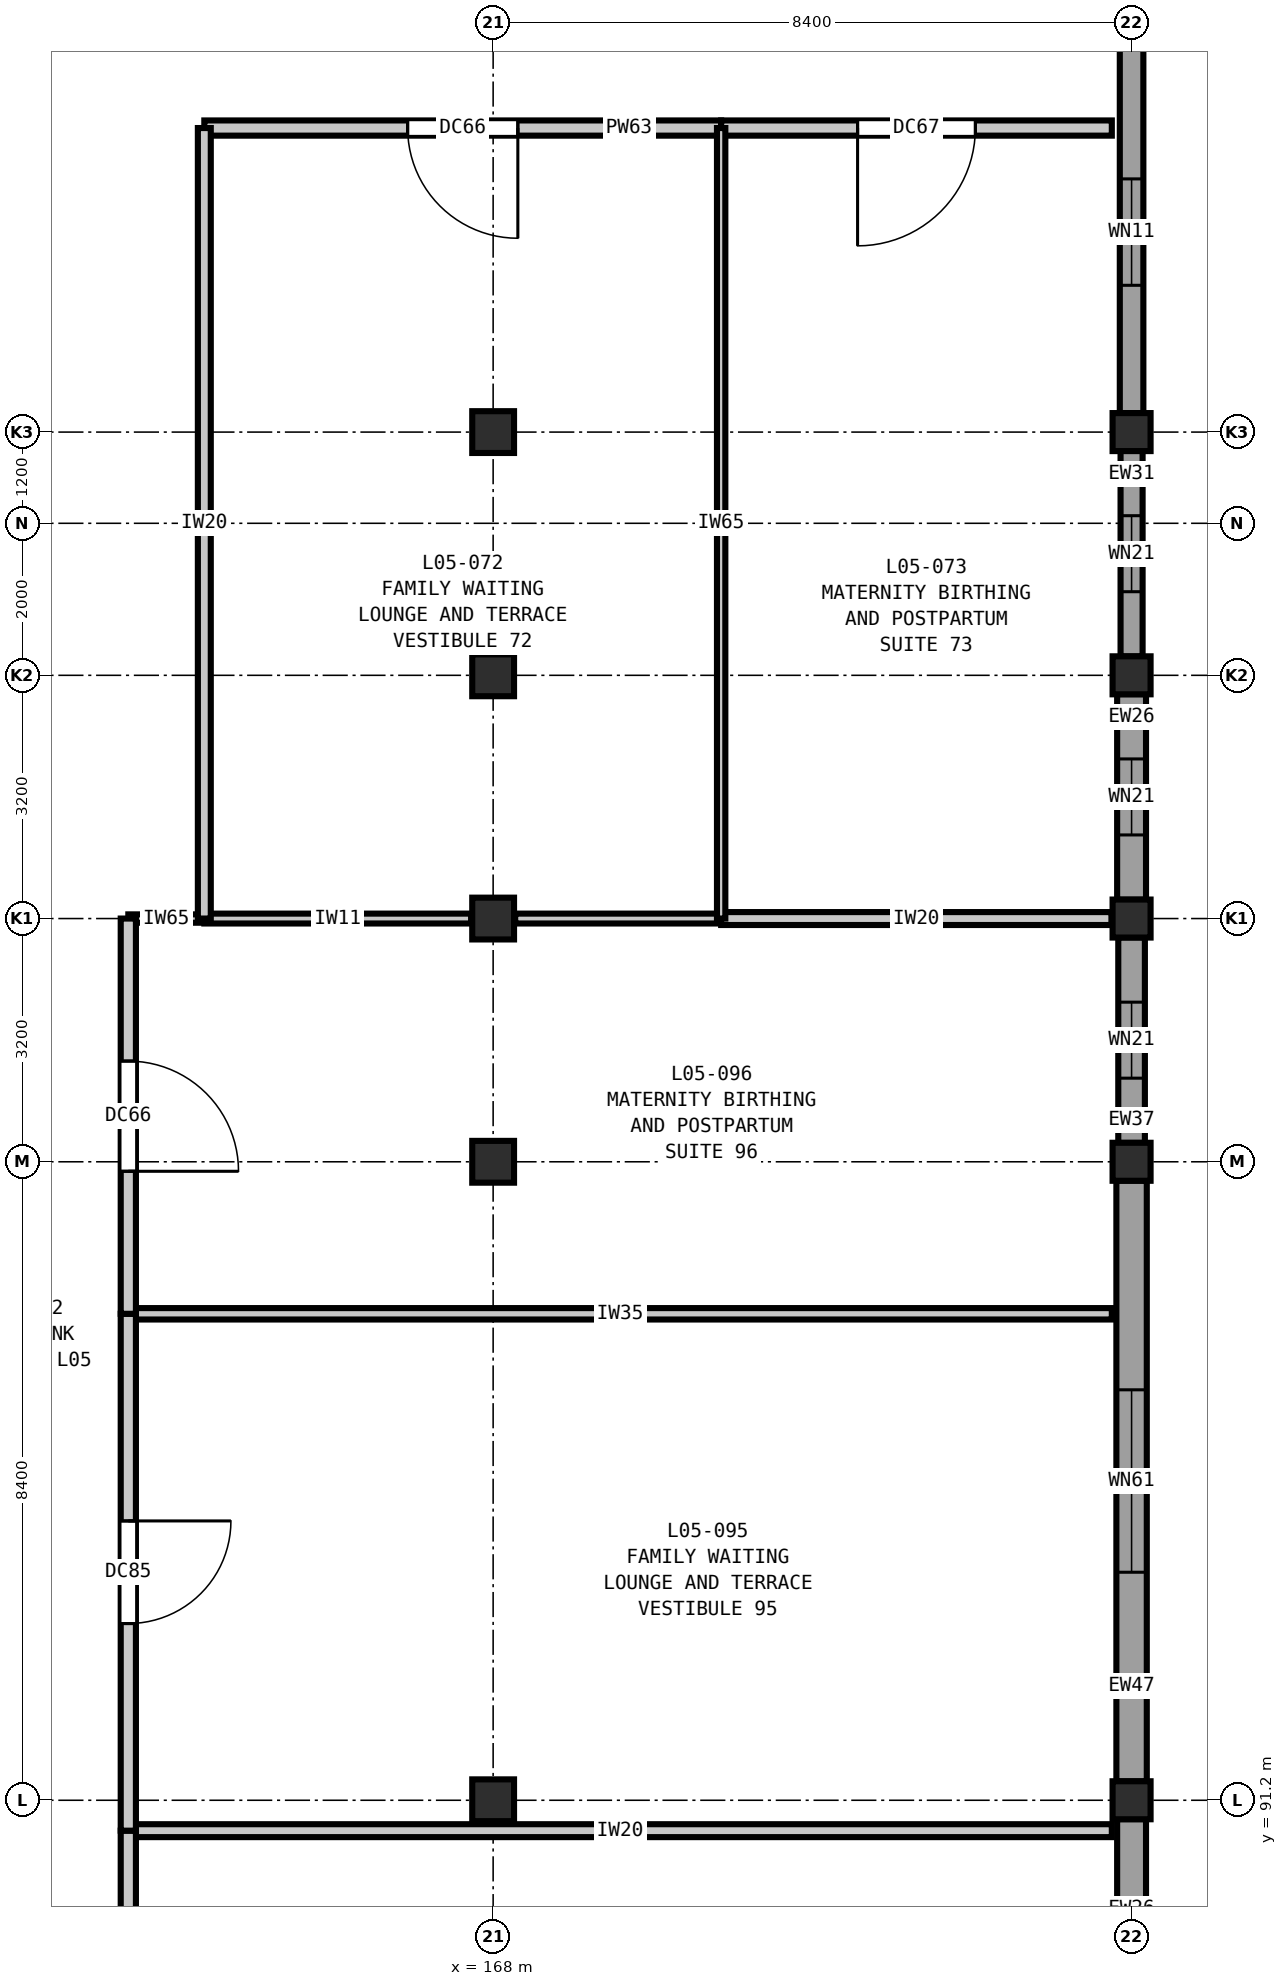
"""IFC4 building model, lengths in metres.
Left out: names, types, materials, properties, quantities, classifications, styles, units other than length and angle.
Written with IfcOpenShell. Run it as: python <this file> out.ifc"""

import sys

from ifc_helpers import new_model, si_unit, direction, frame, frame_2d, origin, origin_2d, place, context, subcontext, project, spatial, rectangle, extrude, element, fill, save


model = new_model("IFC4")
c1 = context("Model", 3, precision=1e-05, world=origin(), true_north=direction((0.0, 1.0)))
c2 = subcontext(c1, "Body", "Model", "MODEL_VIEW")
j1 = project(units=[si_unit("LENGTHUNIT", "METRE"), si_unit("PLANEANGLEUNIT", "RADIAN")], contexts=[c1])
p1 = place(None, origin())
s1 = spatial("IfcSite", under=j1, at=p1, CompositionType="ELEMENT")
p2 = place(p1, origin())
s2 = spatial("IfcBuilding", under=s1, at=p2, CompositionType="ELEMENT")
p3 = place(p2, frame((0.0, 0.0, 24.6)))
s3 = spatial("IfcBuildingStorey", under=s2, at=p3, CompositionType="ELEMENT", Elevation=24.6)
for number, where, z_axis, x_axis in (
    (1, (168.0, 91.2, 0.0), (0.0, 0.0, 1.0), (1.0, 0.0, 0.0)),
    (2, (168.0, 99.6, 0.0), (0.0, 0.0, 1.0), (1.0, 0.0, 0.0)),
    (3, (168.0, 102.8, 0.0), (0.0, 0.0, 1.0), (1.0, 0.0, 0.0)),
    (4, (168.0, 106.0, 0.0), (0.0, 0.0, 1.0), (1.0, 0.0, 0.0)),
    (5, (168.0, 109.2, 0.0), (0.0, 0.0, 1.0), (1.0, 0.0, 0.0)),
):
    element("IfcColumn", number, at=place(p3, frame(where, z_axis=z_axis, x_axis=x_axis)), inside=s3, PredefinedType="COLUMN", context=c2, shape_type="SweptSolid", body=[
        extrude(rectangle(XDim=0.55, YDim=0.55, at=origin_2d()), origin(), (0.0, 0.0, 1.0), 4.2),
    ])
for number, where, z_axis, x_axis in (
    (6, (176.4, 91.2, 0.0), (0.0, 0.0, 1.0), (1.0, 0.0, 0.0)),
    (7, (176.4, 99.6, 0.0), (0.0, 0.0, 1.0), (1.0, 0.0, 0.0)),
    (8, (176.4, 102.8, 0.0), (0.0, 0.0, 1.0), (1.0, 0.0, 0.0)),
    (9, (176.4, 106.0, 0.0), (0.0, 0.0, 1.0), (1.0, 0.0, 0.0)),
    (10, (176.4, 109.2, 0.0), (0.0, 0.0, 1.0), (1.0, 0.0, 0.0)),
):
    element("IfcColumn", number, at=place(p3, frame(where, z_axis=z_axis, x_axis=x_axis)), inside=s3, PredefinedType="COLUMN", context=c2, shape_type="SweptSolid", body=[
        extrude(rectangle(XDim=0.5, YDim=0.5, at=origin_2d()), origin(), (0.0, 0.0, 1.0), 4.2),
    ])
p4 = place(p3, frame((176.4, 116.152, 0.0), z_axis=(0.0, 0.0, 1.0), x_axis=(0.0, -1.0, 0.0)))
e11 = element("IfcWall", 11, at=p4, inside=s3, PredefinedType="SOLIDWALL", context=c2, shape_type="SweptSolid", body=[
    extrude(rectangle(XDim=6.704, YDim=0.31, at=frame_2d((3.352, 0.0))), origin(), (0.0, 0.0, 1.0), 3.48),
])
p5 = place(p4, frame((3.621, 0.0, 0.9)))
e12 = element("IfcOpeningElement", 12, at=p5, cuts=e11, PredefinedType="OPENING", context=c2, shape_type="SweptSolid", body=[
    extrude(rectangle(XDim=1.4, YDim=2.15, at=frame_2d((0.7, 1.075))), frame((0.0, 0.165, 0.0), z_axis=(0.0, -1.0, 0.0), x_axis=(1.0, 0.0, 0.0)), (0.0, 0.0, 1.0), 0.33),
])
p6 = place(p3, frame((176.4, 108.952, 0.0), z_axis=(0.0, 0.0, 1.0), x_axis=(0.0, -1.0, 0.0)))
e13 = element("IfcWall", 13, at=p6, inside=s3, PredefinedType="SOLIDWALL", context=c2, shape_type="SweptSolid", body=[
    extrude(rectangle(XDim=2.704, YDim=0.29, at=frame_2d((1.352, 0.0))), origin(), (0.0, 0.0, 1.0), 3.48),
])
p7 = place(p6, frame((0.852, 0.0, 0.9)))
e14 = element("IfcOpeningElement", 14, at=p7, cuts=e13, PredefinedType="OPENING", context=c2, shape_type="SweptSolid", body=[
    extrude(rectangle(XDim=1.0, YDim=1.55, at=frame_2d((0.5, 0.775))), frame((0.0, 0.155, 0.0), z_axis=(0.0, -1.0, 0.0), x_axis=(1.0, 0.0, 0.0)), (0.0, 0.0, 1.0), 0.31),
])
p8 = place(p3, frame((176.4, 105.752, 0.0), z_axis=(0.0, 0.0, 1.0), x_axis=(0.0, -1.0, 0.0)))
e15 = element("IfcWall", 15, at=p8, inside=s3, PredefinedType="SOLIDWALL", context=c2, shape_type="SweptSolid", body=[
    extrude(rectangle(XDim=2.704, YDim=0.38, at=frame_2d((1.352, 0.0))), origin(), (0.0, 0.0, 1.0), 3.48),
])
p9 = place(p8, frame((0.852, 0.0, 0.9)))
e16 = element("IfcOpeningElement", 16, at=p9, cuts=e15, PredefinedType="OPENING", context=c2, shape_type="SweptSolid", body=[
    extrude(rectangle(XDim=1.0, YDim=1.55, at=frame_2d((0.5, 0.775))), frame((0.0, 0.2, 0.0), z_axis=(0.0, -1.0, 0.0), x_axis=(1.0, 0.0, 0.0)), (0.0, 0.0, 1.0), 0.4),
])
p10 = place(p3, frame((176.4, 102.552, 0.0), z_axis=(0.0, 0.0, 1.0), x_axis=(0.0, -1.0, 0.0)))
e17 = element("IfcWall", 17, at=p10, inside=s3, PredefinedType="SOLIDWALL", context=c2, shape_type="SweptSolid", body=[
    extrude(rectangle(XDim=2.704, YDim=0.35, at=frame_2d((1.352, 0.0))), origin(), (0.0, 0.0, 1.0), 3.48),
])
p11 = place(p10, frame((0.852, 0.0, 0.9)))
e18 = element("IfcOpeningElement", 18, at=p11, cuts=e17, PredefinedType="OPENING", context=c2, shape_type="SweptSolid", body=[
    extrude(rectangle(XDim=1.0, YDim=1.55, at=frame_2d((0.5, 0.775))), frame((0.0, 0.185, 0.0), z_axis=(0.0, -1.0, 0.0), x_axis=(1.0, 0.0, 0.0)), (0.0, 0.0, 1.0), 0.37),
])
p12 = place(p3, frame((176.4, 99.352, 0.0), z_axis=(0.0, 0.0, 1.0), x_axis=(0.0, -1.0, 0.0)))
e19 = element("IfcWall", 19, at=p12, inside=s3, PredefinedType="SOLIDWALL", context=c2, shape_type="SweptSolid", body=[
    extrude(rectangle(XDim=7.904, YDim=0.4, at=frame_2d((3.952, 0.0))), origin(), (0.0, 0.0, 1.0), 3.48),
])
p13 = place(p12, frame((2.752, 0.0, 0.9)))
e20 = element("IfcOpeningElement", 20, at=p13, cuts=e19, PredefinedType="OPENING", context=c2, shape_type="SweptSolid", body=[
    extrude(rectangle(XDim=2.4, YDim=2.15, at=frame_2d((1.2, 1.075))), frame((0.0, 0.21, 0.0), z_axis=(0.0, -1.0, 0.0), x_axis=(1.0, 0.0, 0.0)), (0.0, 0.0, 1.0), 0.42),
])
p14 = place(p3, frame((176.4, 90.952, 0.0), z_axis=(0.0, 0.0, 1.0), x_axis=(0.0, -1.0, 0.0)))
e21 = element("IfcWall", 21, at=p14, inside=s3, PredefinedType="SOLIDWALL", context=c2, shape_type="SweptSolid", body=[
    extrude(rectangle(XDim=7.904, YDim=0.38, at=frame_2d((3.952, 0.0))), origin(), (0.0, 0.0, 1.0), 3.48),
])
p15 = place(p14, frame((2.602, 0.0, 0.9)))
e22 = element("IfcOpeningElement", 22, at=p15, cuts=e21, PredefinedType="OPENING", context=c2, shape_type="SweptSolid", body=[
    extrude(rectangle(XDim=2.7, YDim=2.15, at=frame_2d((1.35, 1.075))), frame((0.0, 0.2, 0.0), z_axis=(0.0, -1.0, 0.0), x_axis=(1.0, 0.0, 0.0)), (0.0, 0.0, 1.0), 0.4),
])
p16 = place(p3, frame((163.2, 90.8, 0.0), z_axis=(0.0, 0.0, 1.0), x_axis=(1.0, 0.0, 0.0)))
e23 = element("IfcWall", 23, at=p16, inside=s3, PredefinedType="PARTITIONING", context=c2, shape_type="SweptSolid", body=[
    extrude(rectangle(XDim=12.94, YDim=0.17, at=frame_2d((6.47, 0.0))), origin(), (0.0, 0.0, 1.0), 3.92),
])
p17 = place(p3, frame((163.2, 97.6, 0.0), z_axis=(0.0, 0.0, 1.0), x_axis=(1.0, 0.0, 0.0)))
e24 = element("IfcWall", 24, at=p17, inside=s3, PredefinedType="PARTITIONING", context=c2, shape_type="SweptSolid", body=[
    extrude(rectangle(XDim=12.94, YDim=0.15, at=frame_2d((6.47, 0.0))), origin(), (0.0, 0.0, 1.0), 3.92),
])
p18 = place(p3, frame((163.2, 102.8, 0.0), z_axis=(0.0, 0.0, 1.0), x_axis=(1.0, 0.0, 0.0)))
e25 = element("IfcWall", 25, at=p18, inside=s3, PredefinedType="PARTITIONING", context=c2, shape_type="SweptSolid", body=[
    extrude(rectangle(XDim=1.0, YDim=0.11, at=frame_2d((0.5, 0.0))), origin(), (0.0, 0.0, 1.0), 3.585),
])
p19 = place(p3, frame((164.2, 102.8, 0.0), z_axis=(0.0, 0.0, 1.0), x_axis=(1.0, 0.0, 0.0)))
e26 = element("IfcWall", 26, at=p19, inside=s3, PredefinedType="PARTITIONING", context=c2, shape_type="SweptSolid", body=[
    extrude(rectangle(XDim=3.51, YDim=0.13, at=frame_2d((1.755, 0.0))), origin(), (0.0, 0.0, 1.0), 3.585),
])
p20 = place(p3, frame((168.29, 102.8, 0.0), z_axis=(0.0, 0.0, 1.0), x_axis=(1.0, 0.0, 0.0)))
e27 = element("IfcWall", 27, at=p20, inside=s3, PredefinedType="PARTITIONING", context=c2, shape_type="SweptSolid", body=[
    extrude(rectangle(XDim=2.71, YDim=0.13, at=frame_2d((1.355, 0.0))), origin(), (0.0, 0.0, 1.0), 3.585),
])
p21 = place(p3, frame((171.0, 102.8, 0.0), z_axis=(0.0, 0.0, 1.0), x_axis=(1.0, 0.0, 0.0)))
e28 = element("IfcWall", 28, at=p21, inside=s3, PredefinedType="PARTITIONING", context=c2, shape_type="SweptSolid", body=[
    extrude(rectangle(XDim=5.135, YDim=0.17, at=frame_2d((2.567, 0.0))), origin(), (0.0, 0.0, 1.0), 3.585),
])
p22 = place(p3, frame((164.2, 113.2, 0.0), z_axis=(0.0, 0.0, 1.0), x_axis=(1.0, 0.0, 0.0)))
e29 = element("IfcWall", 29, at=p22, inside=s3, PredefinedType="PARTITIONING", context=c2, shape_type="SweptSolid", body=[
    extrude(rectangle(XDim=6.8, YDim=0.2, at=frame_2d((3.4, 0.0))), origin(), (0.0, 0.0, 1.0), 3.92),
])
p23 = place(p22, frame((2.675, 0.0, 0.0)))
e30 = element("IfcOpeningElement", 30, at=p23, cuts=e29, PredefinedType="OPENING", context=c2, shape_type="SweptSolid", body=[
    extrude(rectangle(XDim=1.45, YDim=2.25, at=frame_2d((0.725, 1.125))), frame((0.0, 0.11, 0.0), z_axis=(0.0, -1.0, 0.0), x_axis=(1.0, 0.0, 0.0)), (0.0, 0.0, 1.0), 0.22),
])
p24 = place(p3, frame((171.0, 113.2, 0.0), z_axis=(0.0, 0.0, 1.0), x_axis=(1.0, 0.0, 0.0)))
e31 = element("IfcWall", 31, at=p24, inside=s3, PredefinedType="PARTITIONING", context=c2, shape_type="SweptSolid", body=[
    extrude(rectangle(XDim=5.14, YDim=0.2, at=frame_2d((2.57, 0.0))), origin(), (0.0, 0.0, 1.0), 3.92),
])
p25 = place(p24, frame((1.795, 0.0, 0.0)))
e32 = element("IfcOpeningElement", 32, at=p25, cuts=e31, PredefinedType="OPENING", context=c2, shape_type="SweptSolid", body=[
    extrude(rectangle(XDim=1.55, YDim=2.25, at=frame_2d((0.775, 1.125))), frame((0.0, 0.11, 0.0), z_axis=(0.0, -1.0, 0.0), x_axis=(1.0, 0.0, 0.0)), (0.0, 0.0, 1.0), 0.22),
])
p26 = place(p3, frame((163.2, 82.8, 0.0), z_axis=(0.0, 0.0, 1.0), x_axis=(0.0, 1.0, 0.0)))
e33 = element("IfcWall", 33, at=p26, inside=s3, PredefinedType="PARTITIONING", context=c2, shape_type="SweptSolid", body=[
    extrude(rectangle(XDim=8.0, YDim=0.2, at=frame_2d((4.0, 0.0))), origin(), (0.0, 0.0, 1.0), 3.92),
])
p27 = place(p26, frame((3.35, 0.0, 0.0)))
e34 = element("IfcOpeningElement", 34, at=p27, cuts=e33, PredefinedType="OPENING", context=c2, shape_type="SweptSolid", body=[
    extrude(rectangle(XDim=1.3, YDim=2.2, at=frame_2d((0.65, 1.1))), frame((0.0, 0.11, 0.0), z_axis=(0.0, -1.0, 0.0), x_axis=(1.0, 0.0, 0.0)), (0.0, 0.0, 1.0), 0.22),
])
p28 = place(p3, frame((163.2, 90.8, 0.0), z_axis=(0.0, 0.0, 1.0), x_axis=(0.0, 1.0, 0.0)))
e35 = element("IfcWall", 35, at=p28, inside=s3, PredefinedType="PARTITIONING", context=c2, shape_type="SweptSolid", body=[
    extrude(rectangle(XDim=6.8, YDim=0.2, at=frame_2d((3.4, 0.0))), origin(), (0.0, 0.0, 1.0), 3.92),
])
p29 = place(p28, frame((2.725, 0.0, 0.0)))
e36 = element("IfcOpeningElement", 36, at=p29, cuts=e35, PredefinedType="OPENING", context=c2, shape_type="SweptSolid", body=[
    extrude(rectangle(XDim=1.35, YDim=2.2, at=frame_2d((0.675, 1.1))), frame((0.0, 0.11, 0.0), z_axis=(0.0, -1.0, 0.0), x_axis=(1.0, 0.0, 0.0)), (0.0, 0.0, 1.0), 0.22),
])
p30 = place(p3, frame((163.2, 97.6, 0.0), z_axis=(0.0, 0.0, 1.0), x_axis=(0.0, 1.0, 0.0)))
e37 = element("IfcWall", 37, at=p30, inside=s3, PredefinedType="PARTITIONING", context=c2, shape_type="SweptSolid", body=[
    extrude(rectangle(XDim=5.2, YDim=0.2, at=frame_2d((2.6, 0.0))), origin(), (0.0, 0.0, 1.0), 3.92),
])
p31 = place(p30, frame((1.875, 0.0, 0.0)))
e38 = element("IfcOpeningElement", 38, at=p31, cuts=e37, PredefinedType="OPENING", context=c2, shape_type="SweptSolid", body=[
    extrude(rectangle(XDim=1.45, YDim=2.25, at=frame_2d((0.725, 1.125))), frame((0.0, 0.11, 0.0), z_axis=(0.0, -1.0, 0.0), x_axis=(1.0, 0.0, 0.0)), (0.0, 0.0, 1.0), 0.22),
])
p32 = place(p3, frame((164.2, 102.8, 0.0), z_axis=(0.0, 0.0, 1.0), x_axis=(0.0, 1.0, 0.0)))
e39 = element("IfcWall", 39, at=p32, inside=s3, PredefinedType="PARTITIONING", context=c2, shape_type="SweptSolid", body=[
    extrude(rectangle(XDim=10.4, YDim=0.17, at=frame_2d((5.2, 0.0))), origin(), (0.0, 0.0, 1.0), 3.92),
])
p33 = place(p3, frame((171.0, 102.8, 0.0), z_axis=(0.0, 0.0, 1.0), x_axis=(0.0, 1.0, 0.0)))
e40 = element("IfcWall", 40, at=p33, inside=s3, PredefinedType="PARTITIONING", context=c2, shape_type="SweptSolid", body=[
    extrude(rectangle(XDim=10.4, YDim=0.11, at=frame_2d((5.2, 0.0))), origin(), (0.0, 0.0, 1.0), 3.92),
])
p34 = place(p5, origin())
e41 = element("IfcWindow", 41, at=p34, inside=s3, PartitioningType="SINGLE_PANEL", PredefinedType="WINDOW", context=c2, shape_type="SweptSolid", body=[
    extrude(rectangle(XDim=1.4, YDim=2.15, at=frame_2d((0.7, 1.075))), frame((0.0, 0.03, 0.0), z_axis=(0.0, -1.0, 0.0), x_axis=(1.0, 0.0, 0.0)), (0.0, 0.0, 1.0), 0.06),
])
fill(e12, e41)
p35 = place(p7, origin())
e42 = element("IfcWindow", 42, at=p35, inside=s3, PartitioningType="SINGLE_PANEL", PredefinedType="WINDOW", context=c2, shape_type="SweptSolid", body=[
    extrude(rectangle(XDim=1.0, YDim=1.55, at=frame_2d((0.5, 0.775))), frame((0.0, 0.03, 0.0), z_axis=(0.0, -1.0, 0.0), x_axis=(1.0, 0.0, 0.0)), (0.0, 0.0, 1.0), 0.06),
])
fill(e14, e42)
p36 = place(p9, origin())
e43 = element("IfcWindow", 43, at=p36, inside=s3, PartitioningType="SINGLE_PANEL", PredefinedType="WINDOW", context=c2, shape_type="SweptSolid", body=[
    extrude(rectangle(XDim=1.0, YDim=1.55, at=frame_2d((0.5, 0.775))), frame((0.0, 0.03, 0.0), z_axis=(0.0, -1.0, 0.0), x_axis=(1.0, 0.0, 0.0)), (0.0, 0.0, 1.0), 0.06),
])
fill(e16, e43)
p37 = place(p11, origin())
e44 = element("IfcWindow", 44, at=p37, inside=s3, PartitioningType="SINGLE_PANEL", PredefinedType="WINDOW", context=c2, shape_type="SweptSolid", body=[
    extrude(rectangle(XDim=1.0, YDim=1.55, at=frame_2d((0.5, 0.775))), frame((0.0, 0.03, 0.0), z_axis=(0.0, -1.0, 0.0), x_axis=(1.0, 0.0, 0.0)), (0.0, 0.0, 1.0), 0.06),
])
fill(e18, e44)
p38 = place(p13, origin())
e45 = element("IfcWindow", 45, at=p38, inside=s3, PartitioningType="DOUBLE_PANEL_VERTICAL", PredefinedType="WINDOW", context=c2, shape_type="SweptSolid", body=[
    extrude(rectangle(XDim=2.4, YDim=2.15, at=frame_2d((1.2, 1.075))), frame((0.0, 0.03, 0.0), z_axis=(0.0, -1.0, 0.0), x_axis=(1.0, 0.0, 0.0)), (0.0, 0.0, 1.0), 0.06),
])
fill(e20, e45)
p39 = place(p23, frame((1.45, 0.0, 0.0), z_axis=(0.0, 0.0, 1.0), x_axis=(-1.0, 0.0, 0.0)))
e46 = element("IfcDoor", 46, at=p39, inside=s3, OperationType="SINGLE_SWING_LEFT", PredefinedType="DOOR", context=c2, shape_type="SweptSolid", body=[
    extrude(rectangle(XDim=1.45, YDim=2.25, at=frame_2d((0.725, 1.125))), frame((0.0, 0.025, 0.0), z_axis=(0.0, -1.0, 0.0), x_axis=(1.0, 0.0, 0.0)), (0.0, 0.0, 1.0), 0.05),
])
fill(e30, e46)
p40 = place(p25, frame((1.55, 0.0, 0.0), z_axis=(0.0, 0.0, 1.0), x_axis=(-1.0, 0.0, 0.0)))
e47 = element("IfcDoor", 47, at=p40, inside=s3, OperationType="SINGLE_SWING_RIGHT", PredefinedType="DOOR", context=c2, shape_type="SweptSolid", body=[
    extrude(rectangle(XDim=1.55, YDim=2.25, at=frame_2d((0.775, 1.125))), frame((0.0, 0.025, 0.0), z_axis=(0.0, -1.0, 0.0), x_axis=(1.0, 0.0, 0.0)), (0.0, 0.0, 1.0), 0.05),
])
fill(e32, e47)
p41 = place(p29, frame((1.35, 0.0, 0.0), z_axis=(0.0, 0.0, 1.0), x_axis=(-1.0, 0.0, 0.0)))
e48 = element("IfcDoor", 48, at=p41, inside=s3, OperationType="SINGLE_SWING_LEFT", PredefinedType="DOOR", context=c2, shape_type="SweptSolid", body=[
    extrude(rectangle(XDim=1.35, YDim=2.2, at=frame_2d((0.675, 1.1))), frame((0.0, 0.025, 0.0), z_axis=(0.0, -1.0, 0.0), x_axis=(1.0, 0.0, 0.0)), (0.0, 0.0, 1.0), 0.05),
])
fill(e36, e48)
p42 = place(p31, frame((1.45, 0.0, 0.0), z_axis=(0.0, 0.0, 1.0), x_axis=(-1.0, 0.0, 0.0)))
e49 = element("IfcDoor", 49, at=p42, inside=s3, OperationType="SINGLE_SWING_RIGHT", PredefinedType="DOOR", context=c2, shape_type="SweptSolid", body=[
    extrude(rectangle(XDim=1.45, YDim=2.25, at=frame_2d((0.725, 1.125))), frame((0.0, 0.025, 0.0), z_axis=(0.0, -1.0, 0.0), x_axis=(1.0, 0.0, 0.0)), (0.0, 0.0, 1.0), 0.05),
])
fill(e38, e49)
save(model, sys.argv[1])
